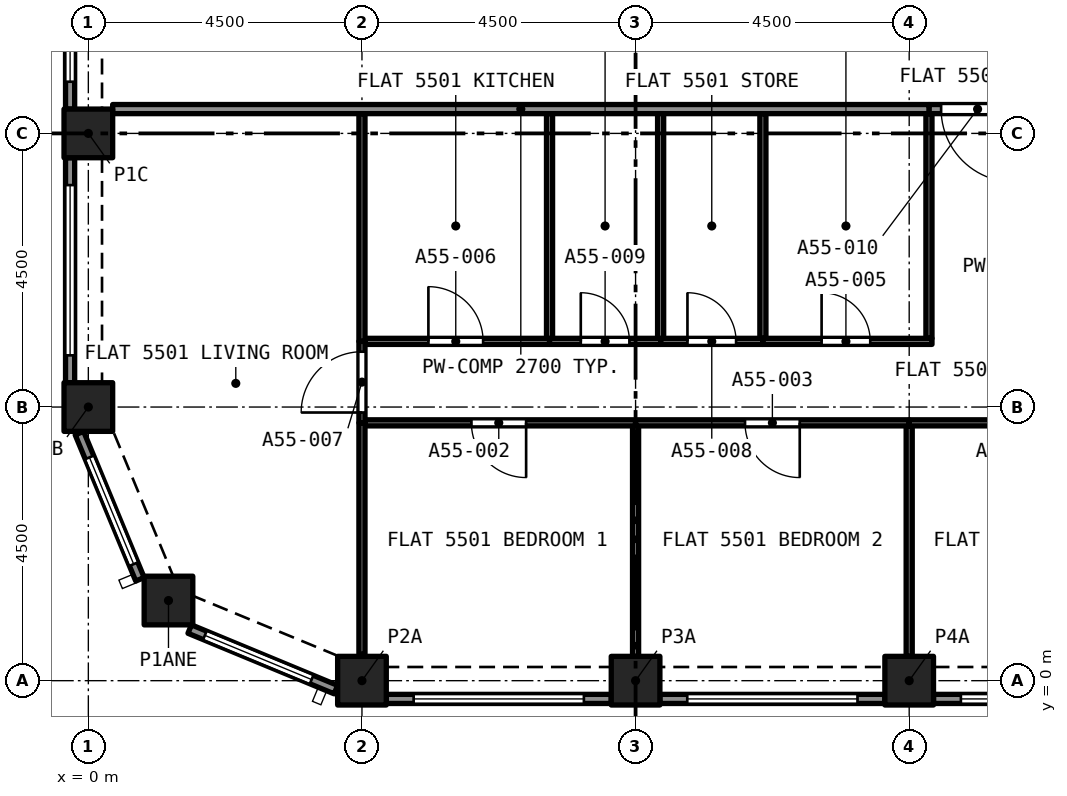
"""IFC4 building model, lengths in metres.
Left out: names, types, materials, properties, quantities, classifications, styles, units other than length and angle.
Written with IfcOpenShell. Run it as: python <this file> out.ifc"""

import sys

from ifc_helpers import new_model, si_unit, direction, frame, frame_2d, origin, origin_2d, place, context, subcontext, project, spatial, rectangle, extrude, element, fill, save


model = new_model("IFC4")
c1 = context("Model", 3, precision=1e-05, world=origin(), true_north=direction((0.0, 1.0)))
c2 = subcontext(c1, "Body", "Model", "MODEL_VIEW")
j1 = project(units=[si_unit("LENGTHUNIT", "METRE"), si_unit("PLANEANGLEUNIT", "RADIAN")], contexts=[c1])
p1 = place(None, origin())
s1 = spatial("IfcSite", under=j1, at=p1, CompositionType="ELEMENT")
p2 = place(p1, origin())
s2 = spatial("IfcBuilding", under=s1, at=p2, CompositionType="ELEMENT")
p3 = place(p2, frame((0.0, 0.0, 198.7)))
s3 = spatial("IfcBuildingStorey", under=s2, at=p3, CompositionType="ELEMENT", Elevation=198.7)
for number, where, z_axis, x_axis in (
    (1, (4.5, 0.0, 0.0), (0.0, 0.0, 1.0), (1.0, 0.0, 0.0)),
    (2, (9.0, 0.0, 0.0), (0.0, 0.0, 1.0), (1.0, 0.0, 0.0)),
    (3, (13.5, 0.0, 0.0), (0.0, 0.0, 1.0), (1.0, 0.0, 0.0)),
    (4, (1.318, 1.318, 0.0), (0.0, 0.0, 1.0), (1.0, 0.0, 0.0)),
    (5, (0.0, 4.5, 0.0), (0.0, 0.0, 1.0), (1.0, 0.0, 0.0)),
    (6, (0.0, 9.0, 0.0), (0.0, 0.0, 1.0), (1.0, 0.0, 0.0)),
):
    element("IfcColumn", number, at=place(p3, frame(where, z_axis=z_axis, x_axis=x_axis)), inside=s3, PredefinedType="COLUMN", context=c2, shape_type="SweptSolid", body=[
        extrude(rectangle(XDim=0.8, YDim=0.8, at=origin_2d()), origin(), (0.0, 0.0, 1.0), 3.2),
    ])
p4 = place(p3, frame((-0.3, 9.4, 0.0), z_axis=(0.0, 0.0, 1.0), x_axis=(0.0, 1.0, 0.0)))
e7 = element("IfcWall", 7, at=p4, inside=s3, PredefinedType="SOLIDWALL", context=c2, shape_type="SweptSolid", body=[
    extrude(rectangle(XDim=3.7, YDim=0.15, at=frame_2d((1.85, 0.0))), origin(), (0.0, 0.0, 1.0), 3.2),
])
p5 = place(p4, frame((0.45, 0.0, 0.45)))
e8 = element("IfcOpeningElement", 8, at=p5, cuts=e7, PredefinedType="OPENING", context=c2, shape_type="SweptSolid", body=[
    extrude(rectangle(XDim=2.8, YDim=1.95, at=frame_2d((1.4, 0.975))), frame((0.0, 0.085, 0.0), z_axis=(0.0, -1.0, 0.0), x_axis=(1.0, 0.0, 0.0)), (0.0, 0.0, 1.0), 0.17),
])
p6 = place(p3, frame((-0.3, 4.9, 0.0), z_axis=(0.0, 0.0, 1.0), x_axis=(0.0, 1.0, 0.0)))
e9 = element("IfcWall", 9, at=p6, inside=s3, PredefinedType="SOLIDWALL", context=c2, shape_type="SweptSolid", body=[
    extrude(rectangle(XDim=3.7, YDim=0.15, at=frame_2d((1.85, 0.0))), origin(), (0.0, 0.0, 1.0), 3.2),
])
p7 = place(p6, frame((0.45, 0.0, 0.45)))
e10 = element("IfcOpeningElement", 10, at=p7, cuts=e9, PredefinedType="OPENING", context=c2, shape_type="SweptSolid", body=[
    extrude(rectangle(XDim=2.8, YDim=1.95, at=frame_2d((1.4, 0.975))), frame((0.0, 0.085, 0.0), z_axis=(0.0, -1.0, 0.0), x_axis=(1.0, 0.0, 0.0)), (0.0, 0.0, 1.0), 0.17),
])
p8 = place(p3, frame((0.849, 1.667, 0.0), z_axis=(0.0, 0.0, 1.0), x_axis=(-0.382669406082, 0.923885342263, 0.0)))
e11 = element("IfcWall", 11, at=p8, inside=s3, PredefinedType="SOLIDWALL", context=c2, shape_type="SweptSolid", body=[
    extrude(rectangle(XDim=2.602, YDim=0.15, at=frame_2d((1.301, 0.0))), origin(), (0.0, 0.0, 1.0), 3.2),
])
p9 = place(p8, frame((0.27, 0.0, 0.45)))
e12 = element("IfcOpeningElement", 12, at=p9, cuts=e11, PredefinedType="OPENING", context=c2, shape_type="SweptSolid", body=[
    extrude(rectangle(XDim=1.9, YDim=1.95, at=frame_2d((0.95, 0.975))), frame((0.0, 0.085, 0.0), z_axis=(0.0, -1.0, 0.0), x_axis=(1.0, 0.0, 0.0)), (0.0, 0.0, 1.0), 0.17),
])
p10 = place(p3, frame((4.071, -0.147, 0.0), z_axis=(0.0, 0.0, 1.0), x_axis=(-0.923885342263, 0.382669406082, 0.0)))
e13 = element("IfcWall", 13, at=p10, inside=s3, PredefinedType="SOLIDWALL", context=c2, shape_type="SweptSolid", body=[
    extrude(rectangle(XDim=2.602, YDim=0.15, at=frame_2d((1.301, 0.0))), origin(), (0.0, 0.0, 1.0), 3.2),
])
p11 = place(p10, frame((0.432, 0.0, 0.45)))
e14 = element("IfcOpeningElement", 14, at=p11, cuts=e13, PredefinedType="OPENING", context=c2, shape_type="SweptSolid", body=[
    extrude(rectangle(XDim=1.9, YDim=1.95, at=frame_2d((0.95, 0.975))), frame((0.0, 0.085, 0.0), z_axis=(0.0, -1.0, 0.0), x_axis=(1.0, 0.0, 0.0)), (0.0, 0.0, 1.0), 0.17),
])
p12 = place(p3, frame((8.6, -0.3, 0.0), z_axis=(0.0, 0.0, 1.0), x_axis=(-1.0, 0.0, 0.0)))
e15 = element("IfcWall", 15, at=p12, inside=s3, PredefinedType="SOLIDWALL", context=c2, shape_type="SweptSolid", body=[
    extrude(rectangle(XDim=3.7, YDim=0.15, at=frame_2d((1.85, 0.0))), origin(), (0.0, 0.0, 1.0), 3.2),
])
p13 = place(p12, frame((0.45, 0.0, 0.45)))
e16 = element("IfcOpeningElement", 16, at=p13, cuts=e15, PredefinedType="OPENING", context=c2, shape_type="SweptSolid", body=[
    extrude(rectangle(XDim=2.8, YDim=1.95, at=frame_2d((1.4, 0.975))), frame((0.0, 0.085, 0.0), z_axis=(0.0, -1.0, 0.0), x_axis=(1.0, 0.0, 0.0)), (0.0, 0.0, 1.0), 0.17),
])
p14 = place(p3, frame((13.1, -0.3, 0.0), z_axis=(0.0, 0.0, 1.0), x_axis=(-1.0, 0.0, 0.0)))
e17 = element("IfcWall", 17, at=p14, inside=s3, PredefinedType="SOLIDWALL", context=c2, shape_type="SweptSolid", body=[
    extrude(rectangle(XDim=3.7, YDim=0.15, at=frame_2d((1.85, 0.0))), origin(), (0.0, 0.0, 1.0), 3.2),
])
p15 = place(p14, frame((0.45, 0.0, 0.45)))
e18 = element("IfcOpeningElement", 18, at=p15, cuts=e17, PredefinedType="OPENING", context=c2, shape_type="SweptSolid", body=[
    extrude(rectangle(XDim=2.8, YDim=1.95, at=frame_2d((1.4, 0.975))), frame((0.0, 0.085, 0.0), z_axis=(0.0, -1.0, 0.0), x_axis=(1.0, 0.0, 0.0)), (0.0, 0.0, 1.0), 0.17),
])
p16 = place(p3, frame((17.6, -0.3, 0.0), z_axis=(0.0, 0.0, 1.0), x_axis=(-1.0, 0.0, 0.0)))
e19 = element("IfcWall", 19, at=p16, inside=s3, PredefinedType="SOLIDWALL", context=c2, shape_type="SweptSolid", body=[
    extrude(rectangle(XDim=3.7, YDim=0.15, at=frame_2d((1.85, 0.0))), origin(), (0.0, 0.0, 1.0), 3.2),
])
p17 = place(p16, frame((0.45, 0.0, 0.45)))
e20 = element("IfcOpeningElement", 20, at=p17, cuts=e19, PredefinedType="OPENING", context=c2, shape_type="SweptSolid", body=[
    extrude(rectangle(XDim=2.8, YDim=1.95, at=frame_2d((1.4, 0.975))), frame((0.0, 0.085, 0.0), z_axis=(0.0, -1.0, 0.0), x_axis=(1.0, 0.0, 0.0)), (0.0, 0.0, 1.0), 0.17),
])
p18 = place(p3, frame((9.0, 0.4, 0.0), z_axis=(0.0, 0.0, 1.0), x_axis=(0.0, 1.0, 0.0)))
e21 = element("IfcWall", 21, at=p18, inside=s3, PredefinedType="PARTITIONING", context=c2, shape_type="SweptSolid", body=[
    extrude(rectangle(XDim=3.79, YDim=0.1, at=frame_2d((1.895, 0.0))), origin(), (0.0, 0.0, 1.0), 2.7),
])
p19 = place(p3, frame((9.0, 4.24, 0.0), z_axis=(0.0, 0.0, 1.0), x_axis=(-1.0, 0.0, 0.0)))
e22 = element("IfcWall", 22, at=p19, inside=s3, PredefinedType="PARTITIONING", context=c2, shape_type="SweptSolid", body=[
    extrude(rectangle(XDim=4.45, YDim=0.1, at=frame_2d((2.225, 0.0))), origin(), (0.0, 0.0, 1.0), 2.7),
])
p20 = place(p19, frame((1.8, 0.0, 0.0)))
e23 = element("IfcOpeningElement", 23, at=p20, cuts=e22, PredefinedType="OPENING", context=c2, shape_type="SweptSolid", body=[
    extrude(rectangle(XDim=0.9, YDim=2.1, at=frame_2d((0.45, 1.05))), frame((0.0, 0.06, 0.0), z_axis=(0.0, -1.0, 0.0), x_axis=(1.0, 0.0, 0.0)), (0.0, 0.0, 1.0), 0.12),
])
p21 = place(p3, frame((4.5, 0.433, 0.0), z_axis=(0.0, 0.0, 1.0), x_axis=(0.0, 1.0, 0.0)))
e24 = element("IfcWall", 24, at=p21, inside=s3, PredefinedType="PARTITIONING", context=c2, shape_type="SweptSolid", body=[
    extrude(rectangle(XDim=3.807, YDim=0.1, at=frame_2d((1.904, 0.0))), origin(), (0.0, 0.0, 1.0), 2.7),
])
p22 = place(p3, frame((13.5, 0.4, 0.0), z_axis=(0.0, 0.0, 1.0), x_axis=(0.0, 1.0, 0.0)))
e25 = element("IfcWall", 25, at=p22, inside=s3, PredefinedType="PARTITIONING", context=c2, shape_type="SweptSolid", body=[
    extrude(rectangle(XDim=3.79, YDim=0.1, at=frame_2d((1.895, 0.0))), origin(), (0.0, 0.0, 1.0), 2.7),
])
p23 = place(p3, frame((13.5, 4.24, 0.0), z_axis=(0.0, 0.0, 1.0), x_axis=(-1.0, 0.0, 0.0)))
e26 = element("IfcWall", 26, at=p23, inside=s3, PredefinedType="PARTITIONING", context=c2, shape_type="SweptSolid", body=[
    extrude(rectangle(XDim=4.5, YDim=0.1, at=frame_2d((2.25, 0.0))), origin(), (0.0, 0.0, 1.0), 2.7),
])
p24 = place(p23, frame((1.8, 0.0, 0.0)))
e27 = element("IfcOpeningElement", 27, at=p24, cuts=e26, PredefinedType="OPENING", context=c2, shape_type="SweptSolid", body=[
    extrude(rectangle(XDim=0.9, YDim=2.1, at=frame_2d((0.45, 1.05))), frame((0.0, 0.06, 0.0), z_axis=(0.0, -1.0, 0.0), x_axis=(1.0, 0.0, 0.0)), (0.0, 0.0, 1.0), 0.12),
])
p25 = place(p3, frame((17.6, 4.24, 0.0), z_axis=(0.0, 0.0, 1.0), x_axis=(-1.0, 0.0, 0.0)))
e28 = element("IfcWall", 28, at=p25, inside=s3, PredefinedType="PARTITIONING", context=c2, shape_type="SweptSolid", body=[
    extrude(rectangle(XDim=4.1, YDim=0.1, at=frame_2d((2.05, 0.0))), origin(), (0.0, 0.0, 1.0), 2.7),
])
p26 = place(p25, frame((1.4, 0.0, 0.0)))
e29 = element("IfcOpeningElement", 29, at=p26, cuts=e28, PredefinedType="OPENING", context=c2, shape_type="SweptSolid", body=[
    extrude(rectangle(XDim=0.9, YDim=2.1, at=frame_2d((0.45, 1.05))), frame((0.0, 0.06, 0.0), z_axis=(0.0, -1.0, 0.0), x_axis=(1.0, 0.0, 0.0)), (0.0, 0.0, 1.0), 0.12),
])
p27 = place(p3, frame((13.825, 5.63, 0.0), z_axis=(0.0, 0.0, 1.0), x_axis=(0.0, 1.0, 0.0)))
e30 = element("IfcWall", 30, at=p27, inside=s3, PredefinedType="PARTITIONING", context=c2, shape_type="SweptSolid", body=[
    extrude(rectangle(XDim=3.695, YDim=0.1, at=frame_2d((1.848, 0.0))), origin(), (0.0, 0.0, 1.0), 2.7),
])
p28 = place(p3, frame((11.094, 5.58, 0.0), z_axis=(0.0, 0.0, 1.0), x_axis=(1.0, 0.0, 0.0)))
e31 = element("IfcWall", 31, at=p28, inside=s3, PredefinedType="PARTITIONING", context=c2, shape_type="SweptSolid", body=[
    extrude(rectangle(XDim=2.781, YDim=0.1, at=frame_2d((1.391, 0.0))), origin(), (0.0, 0.0, 1.0), 2.7),
])
p29 = place(p28, frame((0.966, 0.0, 0.0)))
e32 = element("IfcOpeningElement", 32, at=p29, cuts=e31, PredefinedType="OPENING", context=c2, shape_type="SweptSolid", body=[
    extrude(rectangle(XDim=0.8, YDim=2.1, at=frame_2d((0.4, 1.05))), frame((0.0, 0.06, 0.0), z_axis=(0.0, -1.0, 0.0), x_axis=(1.0, 0.0, 0.0)), (0.0, 0.0, 1.0), 0.12),
])
p30 = place(p3, frame((11.094, 5.63, 0.0), z_axis=(0.0, 0.0, 1.0), x_axis=(0.0, 1.0, 0.0)))
e33 = element("IfcWall", 33, at=p30, inside=s3, PredefinedType="PARTITIONING", context=c2, shape_type="SweptSolid", body=[
    extrude(rectangle(XDim=3.695, YDim=0.1, at=frame_2d((1.848, 0.0))), origin(), (0.0, 0.0, 1.0), 2.7),
])
p31 = place(p3, frame((4.55, 5.58, 0.0), z_axis=(0.0, 0.0, 1.0), x_axis=(1.0, 0.0, 0.0)))
e34 = element("IfcWall", 34, at=p31, inside=s3, PredefinedType="PARTITIONING", context=c2, shape_type="SweptSolid", body=[
    extrude(rectangle(XDim=3.035, YDim=0.1, at=frame_2d((1.518, 0.0))), origin(), (0.0, 0.0, 1.0), 2.7),
])
p32 = place(p31, frame((1.043, 0.0, 0.0)))
e35 = element("IfcOpeningElement", 35, at=p32, cuts=e34, PredefinedType="OPENING", context=c2, shape_type="SweptSolid", body=[
    extrude(rectangle(XDim=0.9, YDim=2.1, at=frame_2d((0.45, 1.05))), frame((0.0, 0.06, 0.0), z_axis=(0.0, -1.0, 0.0), x_axis=(1.0, 0.0, 0.0)), (0.0, 0.0, 1.0), 0.12),
])
p33 = place(p3, frame((4.5, 4.24, 0.0), z_axis=(0.0, 0.0, 1.0), x_axis=(0.0, 1.0, 0.0)))
e36 = element("IfcWall", 36, at=p33, inside=s3, PredefinedType="PARTITIONING", context=c2, shape_type="SweptSolid", body=[
    extrude(rectangle(XDim=1.34, YDim=0.1, at=frame_2d((0.67, 0.0))), origin(), (0.0, 0.0, 1.0), 2.7),
])
p34 = place(p33, frame((0.17, 0.0, 0.0)))
e37 = element("IfcOpeningElement", 37, at=p34, cuts=e36, PredefinedType="OPENING", context=c2, shape_type="SweptSolid", body=[
    extrude(rectangle(XDim=1.0, YDim=2.1, at=frame_2d((0.5, 1.05))), frame((0.0, 0.06, 0.0), z_axis=(0.0, -1.0, 0.0), x_axis=(1.0, 0.0, 0.0)), (0.0, 0.0, 1.0), 0.12),
])
p35 = place(p3, frame((9.412, 5.58, 0.0), z_axis=(0.0, 0.0, 1.0), x_axis=(1.0, 0.0, 0.0)))
e38 = element("IfcWall", 38, at=p35, inside=s3, PredefinedType="PARTITIONING", context=c2, shape_type="SweptSolid", body=[
    extrude(rectangle(XDim=1.682, YDim=0.1, at=frame_2d((0.841, 0.0))), origin(), (0.0, 0.0, 1.0), 2.7),
])
p36 = place(p35, frame((0.441, 0.0, 0.0)))
e39 = element("IfcOpeningElement", 39, at=p36, cuts=e38, PredefinedType="OPENING", context=c2, shape_type="SweptSolid", body=[
    extrude(rectangle(XDim=0.8, YDim=2.1, at=frame_2d((0.4, 1.05))), frame((0.0, 0.06, 0.0), z_axis=(0.0, -1.0, 0.0), x_axis=(1.0, 0.0, 0.0)), (0.0, 0.0, 1.0), 0.12),
])
p37 = place(p3, frame((7.585, 5.58, 0.0), z_axis=(0.0, 0.0, 1.0), x_axis=(1.0, 0.0, 0.0)))
e40 = element("IfcWall", 40, at=p37, inside=s3, PredefinedType="PARTITIONING", context=c2, shape_type="SweptSolid", body=[
    extrude(rectangle(XDim=1.827, YDim=0.1, at=frame_2d((0.914, 0.0))), origin(), (0.0, 0.0, 1.0), 2.7),
])
p38 = place(p37, frame((0.513, 0.0, 0.0)))
e41 = element("IfcOpeningElement", 41, at=p38, cuts=e40, PredefinedType="OPENING", context=c2, shape_type="SweptSolid", body=[
    extrude(rectangle(XDim=0.8, YDim=2.1, at=frame_2d((0.4, 1.05))), frame((0.0, 0.06, 0.0), z_axis=(0.0, -1.0, 0.0), x_axis=(1.0, 0.0, 0.0)), (0.0, 0.0, 1.0), 0.12),
])
p39 = place(p3, frame((15.425, 9.4, 0.0), z_axis=(0.0, 0.0, 1.0), x_axis=(-1.0, 0.0, 0.0)))
e42 = element("IfcWall", 42, at=p39, inside=s3, PredefinedType="PARTITIONING", context=c2, shape_type="SweptSolid", body=[
    extrude(rectangle(XDim=1.6, YDim=0.15, at=frame_2d((0.8, 0.0))), origin(), (0.0, 0.0, 1.0), 2.7),
])
p40 = place(p39, frame((0.2, 0.0, 0.0)))
e43 = element("IfcOpeningElement", 43, at=p40, cuts=e42, PredefinedType="OPENING", context=c2, shape_type="SweptSolid", body=[
    extrude(rectangle(XDim=1.2, YDim=2.4, at=frame_2d((0.6, 1.2))), frame((0.0, 0.085, 0.0), z_axis=(0.0, -1.0, 0.0), x_axis=(1.0, 0.0, 0.0)), (0.0, 0.0, 1.0), 0.17),
])
p41 = place(p3, frame((4.5, 5.58, 0.0), z_axis=(0.0, 0.0, 1.0), x_axis=(0.0, 1.0, 0.0)))
e44 = element("IfcWall", 44, at=p41, inside=s3, PredefinedType="PARTITIONING", context=c2, shape_type="SweptSolid", body=[
    extrude(rectangle(XDim=3.745, YDim=0.1, at=frame_2d((1.873, 0.0))), origin(), (0.0, 0.0, 1.0), 2.7),
])
p42 = place(p3, frame((7.585, 5.63, 0.0), z_axis=(0.0, 0.0, 1.0), x_axis=(0.0, 1.0, 0.0)))
e45 = element("IfcWall", 45, at=p42, inside=s3, PredefinedType="PARTITIONING", context=c2, shape_type="SweptSolid", body=[
    extrude(rectangle(XDim=3.695, YDim=0.1, at=frame_2d((1.848, 0.0))), origin(), (0.0, 0.0, 1.0), 2.7),
])
p43 = place(p3, frame((0.4, 9.4, 0.0), z_axis=(0.0, 0.0, 1.0), x_axis=(1.0, 0.0, 0.0)))
e46 = element("IfcWall", 46, at=p43, inside=s3, PredefinedType="PARTITIONING", context=c2, shape_type="SweptSolid", body=[
    extrude(rectangle(XDim=13.425, YDim=0.15, at=frame_2d((6.712, 0.0))), origin(), (0.0, 0.0, 1.0), 2.7),
])
p44 = place(p3, frame((9.412, 5.63, 0.0), z_axis=(0.0, 0.0, 1.0), x_axis=(0.0, 1.0, 0.0)))
e47 = element("IfcWall", 47, at=p44, inside=s3, PredefinedType="PARTITIONING", context=c2, shape_type="SweptSolid", body=[
    extrude(rectangle(XDim=3.695, YDim=0.1, at=frame_2d((1.848, 0.0))), origin(), (0.0, 0.0, 1.0), 2.7),
])
p45 = place(p5, origin())
e48 = element("IfcWindow", 48, at=p45, inside=s3, PartitioningType="SINGLE_PANEL", PredefinedType="WINDOW", context=c2, shape_type="SweptSolid", body=[
    extrude(rectangle(XDim=2.8, YDim=1.95, at=frame_2d((1.4, 0.975))), frame((0.0, 0.03, 0.0), z_axis=(0.0, -1.0, 0.0), x_axis=(1.0, 0.0, 0.0)), (0.0, 0.0, 1.0), 0.06),
])
fill(e8, e48)
p46 = place(p7, origin())
e49 = element("IfcWindow", 49, at=p46, inside=s3, PartitioningType="SINGLE_PANEL", PredefinedType="WINDOW", context=c2, shape_type="SweptSolid", body=[
    extrude(rectangle(XDim=2.8, YDim=1.95, at=frame_2d((1.4, 0.975))), frame((0.0, 0.03, 0.0), z_axis=(0.0, -1.0, 0.0), x_axis=(1.0, 0.0, 0.0)), (0.0, 0.0, 1.0), 0.06),
])
fill(e10, e49)
p47 = place(p9, origin())
e50 = element("IfcWindow", 50, at=p47, inside=s3, PartitioningType="SINGLE_PANEL", PredefinedType="WINDOW", context=c2, shape_type="SweptSolid", body=[
    extrude(rectangle(XDim=1.9, YDim=1.95, at=frame_2d((0.95, 0.975))), frame((0.0, 0.03, 0.0), z_axis=(0.0, -1.0, 0.0), x_axis=(1.0, 0.0, 0.0)), (0.0, 0.0, 1.0), 0.06),
])
fill(e12, e50)
p48 = place(p11, origin())
e51 = element("IfcWindow", 51, at=p48, inside=s3, PartitioningType="SINGLE_PANEL", PredefinedType="WINDOW", context=c2, shape_type="SweptSolid", body=[
    extrude(rectangle(XDim=1.9, YDim=1.95, at=frame_2d((0.95, 0.975))), frame((0.0, 0.03, 0.0), z_axis=(0.0, -1.0, 0.0), x_axis=(1.0, 0.0, 0.0)), (0.0, 0.0, 1.0), 0.06),
])
fill(e14, e51)
p49 = place(p13, origin())
e52 = element("IfcWindow", 52, at=p49, inside=s3, PartitioningType="SINGLE_PANEL", PredefinedType="WINDOW", context=c2, shape_type="SweptSolid", body=[
    extrude(rectangle(XDim=2.8, YDim=1.95, at=frame_2d((1.4, 0.975))), frame((0.0, 0.03, 0.0), z_axis=(0.0, -1.0, 0.0), x_axis=(1.0, 0.0, 0.0)), (0.0, 0.0, 1.0), 0.06),
])
fill(e16, e52)
p50 = place(p15, origin())
e53 = element("IfcWindow", 53, at=p50, inside=s3, PartitioningType="SINGLE_PANEL", PredefinedType="WINDOW", context=c2, shape_type="SweptSolid", body=[
    extrude(rectangle(XDim=2.8, YDim=1.95, at=frame_2d((1.4, 0.975))), frame((0.0, 0.03, 0.0), z_axis=(0.0, -1.0, 0.0), x_axis=(1.0, 0.0, 0.0)), (0.0, 0.0, 1.0), 0.06),
])
fill(e18, e53)
p51 = place(p17, origin())
e54 = element("IfcWindow", 54, at=p51, inside=s3, PartitioningType="SINGLE_PANEL", PredefinedType="WINDOW", context=c2, shape_type="SweptSolid", body=[
    extrude(rectangle(XDim=2.8, YDim=1.95, at=frame_2d((1.4, 0.975))), frame((0.0, 0.03, 0.0), z_axis=(0.0, -1.0, 0.0), x_axis=(1.0, 0.0, 0.0)), (0.0, 0.0, 1.0), 0.06),
])
fill(e20, e54)
p52 = place(p20, origin())
e55 = element("IfcDoor", 55, at=p52, inside=s3, OperationType="SINGLE_SWING_RIGHT", PredefinedType="DOOR", context=c2, shape_type="SweptSolid", body=[
    extrude(rectangle(XDim=0.9, YDim=2.1, at=frame_2d((0.45, 1.05))), frame((0.0, 0.025, 0.0), z_axis=(0.0, -1.0, 0.0), x_axis=(1.0, 0.0, 0.0)), (0.0, 0.0, 1.0), 0.05),
])
fill(e23, e55)
p53 = place(p24, origin())
e56 = element("IfcDoor", 56, at=p53, inside=s3, OperationType="SINGLE_SWING_LEFT", PredefinedType="DOOR", context=c2, shape_type="SweptSolid", body=[
    extrude(rectangle(XDim=0.9, YDim=2.1, at=frame_2d((0.45, 1.05))), frame((0.0, 0.025, 0.0), z_axis=(0.0, -1.0, 0.0), x_axis=(1.0, 0.0, 0.0)), (0.0, 0.0, 1.0), 0.05),
])
fill(e27, e56)
p54 = place(p29, origin())
e57 = element("IfcDoor", 57, at=p54, inside=s3, OperationType="SINGLE_SWING_LEFT", PredefinedType="DOOR", context=c2, shape_type="SweptSolid", body=[
    extrude(rectangle(XDim=0.8, YDim=2.1, at=frame_2d((0.4, 1.05))), frame((0.0, 0.025, 0.0), z_axis=(0.0, -1.0, 0.0), x_axis=(1.0, 0.0, 0.0)), (0.0, 0.0, 1.0), 0.05),
])
fill(e32, e57)
p55 = place(p32, origin())
e58 = element("IfcDoor", 58, at=p55, inside=s3, OperationType="SINGLE_SWING_LEFT", PredefinedType="DOOR", context=c2, shape_type="SweptSolid", body=[
    extrude(rectangle(XDim=0.9, YDim=2.1, at=frame_2d((0.45, 1.05))), frame((0.0, 0.025, 0.0), z_axis=(0.0, -1.0, 0.0), x_axis=(1.0, 0.0, 0.0)), (0.0, 0.0, 1.0), 0.05),
])
fill(e35, e58)
p56 = place(p34, origin())
e59 = element("IfcDoor", 59, at=p56, inside=s3, OperationType="SINGLE_SWING_RIGHT", PredefinedType="DOOR", context=c2, shape_type="SweptSolid", body=[
    extrude(rectangle(XDim=1.0, YDim=2.1, at=frame_2d((0.5, 1.05))), frame((0.0, 0.025, 0.0), z_axis=(0.0, -1.0, 0.0), x_axis=(1.0, 0.0, 0.0)), (0.0, 0.0, 1.0), 0.05),
])
fill(e37, e59)
p57 = place(p36, origin())
e60 = element("IfcDoor", 60, at=p57, inside=s3, OperationType="SINGLE_SWING_LEFT", PredefinedType="DOOR", context=c2, shape_type="SweptSolid", body=[
    extrude(rectangle(XDim=0.8, YDim=2.1, at=frame_2d((0.4, 1.05))), frame((0.0, 0.025, 0.0), z_axis=(0.0, -1.0, 0.0), x_axis=(1.0, 0.0, 0.0)), (0.0, 0.0, 1.0), 0.05),
])
fill(e39, e60)
p58 = place(p38, origin())
e61 = element("IfcDoor", 61, at=p58, inside=s3, OperationType="SINGLE_SWING_LEFT", PredefinedType="DOOR", context=c2, shape_type="SweptSolid", body=[
    extrude(rectangle(XDim=0.8, YDim=2.1, at=frame_2d((0.4, 1.05))), frame((0.0, 0.025, 0.0), z_axis=(0.0, -1.0, 0.0), x_axis=(1.0, 0.0, 0.0)), (0.0, 0.0, 1.0), 0.05),
])
fill(e41, e61)
p59 = place(p40, origin())
e62 = element("IfcDoor", 62, at=p59, inside=s3, OperationType="SINGLE_SWING_LEFT", PredefinedType="DOOR", context=c2, shape_type="SweptSolid", body=[
    extrude(rectangle(XDim=1.2, YDim=2.4, at=frame_2d((0.6, 1.2))), frame((0.0, 0.025, 0.0), z_axis=(0.0, -1.0, 0.0), x_axis=(1.0, 0.0, 0.0)), (0.0, 0.0, 1.0), 0.05),
])
fill(e43, e62)
save(model, sys.argv[1])
